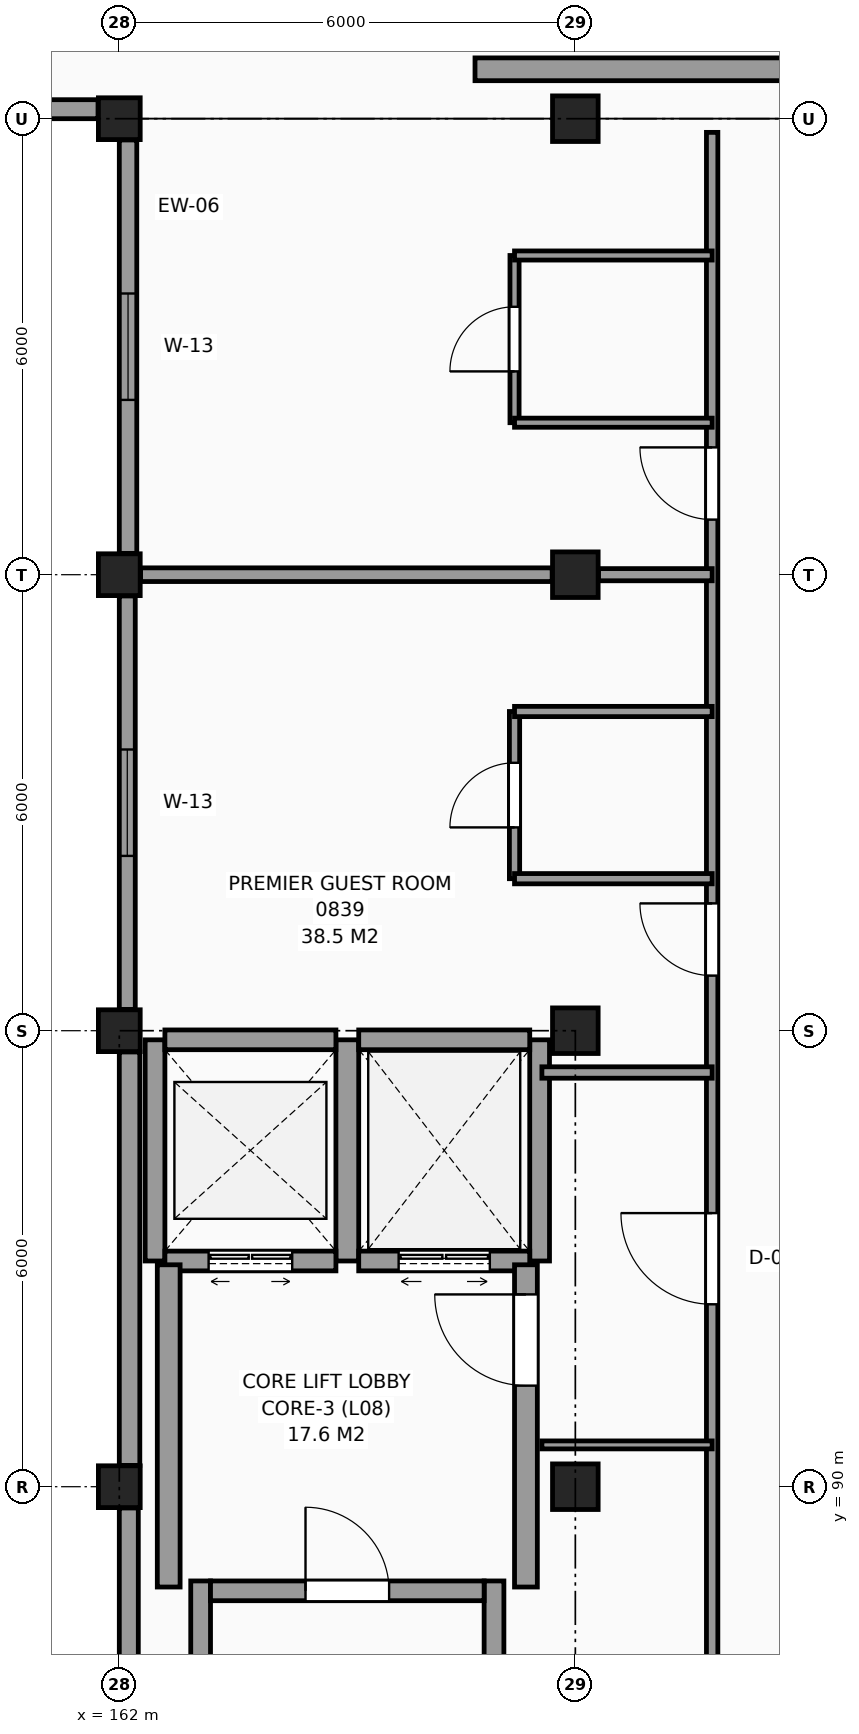
"""IFC4 building model, lengths in metres.
Left out: names, types, materials, properties, quantities, classifications, styles, units other than length and angle.
Written with IfcOpenShell. Run it as: python <this file> out.ifc"""

import sys

from ifc_helpers import new_model, si_unit, direction, frame, frame_2d, origin, origin_2d, place, context, subcontext, project, spatial, rectangle, extrude, element, fill, save


model = new_model("IFC4")
c1 = context("Model", 3, precision=1e-05, world=origin(), true_north=direction((0.0, 1.0)))
c2 = subcontext(c1, "Body", "Model", "MODEL_VIEW")
j1 = project(units=[si_unit("LENGTHUNIT", "METRE"), si_unit("PLANEANGLEUNIT", "RADIAN")], contexts=[c1])
p1 = place(None, origin())
s1 = spatial("IfcSite", under=j1, at=p1, CompositionType="ELEMENT")
p2 = place(p1, origin())
s2 = spatial("IfcBuilding", under=s1, at=p2, CompositionType="ELEMENT")
p3 = place(p2, frame((0.0, 0.0, 34.8)))
s3 = spatial("IfcBuildingStorey", under=s2, at=p3, CompositionType="ELEMENT", Elevation=34.8)
for number, where, z_axis, x_axis in (
    (1, (162.0, 90.0, 0.0), (0.0, 0.0, 1.0), (1.0, 0.0, 0.0)),
    (2, (162.0, 96.0, 0.0), (0.0, 0.0, 1.0), (1.0, 0.0, 0.0)),
    (3, (162.0, 102.0, 0.0), (0.0, 0.0, 1.0), (1.0, 0.0, 0.0)),
    (4, (162.0, 108.0, 0.0), (0.0, 0.0, 1.0), (1.0, 0.0, 0.0)),
):
    element("IfcColumn", number, at=place(p3, frame(where, z_axis=z_axis, x_axis=x_axis)), inside=s3, PredefinedType="COLUMN", context=c2, shape_type="SweptSolid", body=[
        extrude(rectangle(XDim=0.55, YDim=0.55, at=origin_2d()), origin(), (0.0, 0.0, 1.0), 3.3),
    ])
for number, where, z_axis, x_axis in (
    (5, (168.0, 90.0, 0.0), (0.0, 0.0, 1.0), (1.0, 0.0, 0.0)),
    (6, (168.0, 96.0, 0.0), (0.0, 0.0, 1.0), (1.0, 0.0, 0.0)),
    (7, (168.0, 102.0, 0.0), (0.0, 0.0, 1.0), (1.0, 0.0, 0.0)),
    (8, (168.0, 108.0, 0.0), (0.0, 0.0, 1.0), (1.0, 0.0, 0.0)),
):
    element("IfcColumn", number, at=place(p3, frame(where, z_axis=z_axis, x_axis=x_axis)), inside=s3, PredefinedType="COLUMN", context=c2, shape_type="SweptSolid", body=[
        extrude(rectangle(XDim=0.6, YDim=0.6, at=origin_2d()), origin(), (0.0, 0.0, 1.0), 3.3),
    ])
p4 = place(p3, frame((156.305, 108.125, 0.0), z_axis=(0.0, 0.0, 1.0), x_axis=(1.0, 0.0, 0.0)))
e9 = element("IfcWall", 9, at=p4, inside=s3, PredefinedType="SOLIDWALL", context=c2, shape_type="SweptSolid", body=[
    extrude(rectangle(XDim=5.415, YDim=0.25, at=frame_2d((2.708, 0.0))), origin(), (0.0, 0.0, 1.0), 3.07),
])
p5 = place(p3, frame((162.115, 107.72, 0.0), z_axis=(0.0, 0.0, 1.0), x_axis=(0.0, -1.0, 0.0)))
e10 = element("IfcWall", 10, at=p5, inside=s3, PredefinedType="SOLIDWALL", context=c2, shape_type="SweptSolid", body=[
    extrude(rectangle(XDim=5.44, YDim=0.23, at=frame_2d((2.72, 0.0))), origin(), (0.0, 0.0, 1.0), 2.42),
])
p6 = place(p5, frame((2.02, 0.0, 0.8)))
e11 = element("IfcOpeningElement", 11, at=p6, cuts=e10, PredefinedType="OPENING", context=c2, shape_type="SweptSolid", body=[
    extrude(rectangle(XDim=1.4, YDim=1.4, at=frame_2d((0.7, 0.7))), frame((0.0, 0.125, 0.0), z_axis=(0.0, -1.0, 0.0), x_axis=(1.0, 0.0, 0.0)), (0.0, 0.0, 1.0), 0.25),
])
p7 = place(p3, frame((162.105, 101.72, 0.0), z_axis=(0.0, 0.0, 1.0), x_axis=(0.0, -1.0, 0.0)))
e12 = element("IfcWall", 12, at=p7, inside=s3, PredefinedType="SOLIDWALL", context=c2, shape_type="SweptSolid", body=[
    extrude(rectangle(XDim=5.44, YDim=0.21, at=frame_2d((2.72, 0.0))), origin(), (0.0, 0.0, 1.0), 2.42),
])
p8 = place(p7, frame((2.02, 0.0, 0.8)))
e13 = element("IfcOpeningElement", 13, at=p8, cuts=e12, PredefinedType="OPENING", context=c2, shape_type="SweptSolid", body=[
    extrude(rectangle(XDim=1.4, YDim=1.4, at=frame_2d((0.7, 0.7))), frame((0.0, 0.115, 0.0), z_axis=(0.0, -1.0, 0.0), x_axis=(1.0, 0.0, 0.0)), (0.0, 0.0, 1.0), 0.23),
])
p9 = place(p3, frame((162.135, 95.72, 0.0), z_axis=(0.0, 0.0, 1.0), x_axis=(0.0, -1.0, 0.0)))
e14 = element("IfcWall", 14, at=p9, inside=s3, PredefinedType="SOLIDWALL", context=c2, shape_type="SweptSolid", body=[
    extrude(rectangle(XDim=5.44, YDim=0.27, at=frame_2d((2.72, 0.0))), origin(), (0.0, 0.0, 1.0), 2.42),
])
p10 = place(p3, frame((162.125, 89.72, 0.0), z_axis=(0.0, 0.0, 1.0), x_axis=(0.0, -1.0, 0.0)))
e15 = element("IfcWall", 15, at=p10, inside=s3, PredefinedType="SOLIDWALL", context=c2, shape_type="SweptSolid", body=[
    extrude(rectangle(XDim=5.44, YDim=0.25, at=frame_2d((2.72, 0.0))), origin(), (0.0, 0.0, 1.0), 2.42),
])
p11 = place(p3, frame((166.68, 108.65, 0.0), z_axis=(0.0, 0.0, 1.0), x_axis=(1.0, 0.0, 0.0)))
e16 = element("IfcWall", 16, at=p11, inside=s3, PredefinedType="SHEAR", context=c2, shape_type="SweptSolid", body=[
    extrude(rectangle(XDim=4.24, YDim=0.3, at=frame_2d((2.12, 0.0))), origin(), (0.0, 0.0, 1.0), 3.3),
])
for number, where, z_axis, x_axis in (
    (17, (163.07, 78.04, 0.0), (0.0, 0.0, 1.0), (0.0, 1.0, 0.0)),
    (18, (166.93, 78.04, 0.0), (0.0, 0.0, 1.0), (0.0, 1.0, 0.0)),
):
    element("IfcWall", number, at=place(p3, frame(where, z_axis=z_axis, x_axis=x_axis)), inside=s3, PredefinedType="SHEAR", context=c2, shape_type="SweptSolid", body=[
        extrude(rectangle(XDim=10.72, YDim=0.26, at=frame_2d((5.36, 0.0))), origin(), (0.0, 0.0, 1.0), 3.3),
    ])
p12 = place(p3, frame((163.2, 88.63, 0.0), z_axis=(0.0, 0.0, 1.0), x_axis=(1.0, 0.0, 0.0)))
e19 = element("IfcWall", 19, at=p12, inside=s3, PredefinedType="SHEAR", context=c2, shape_type="SweptSolid", body=[
    extrude(rectangle(XDim=3.6, YDim=0.26, at=frame_2d((1.8, 0.0))), origin(), (0.0, 0.0, 1.0), 3.3),
])
p13 = place(p12, frame((1.25, 0.0, 0.0)))
e20 = element("IfcOpeningElement", 20, at=p13, cuts=e19, PredefinedType="OPENING", context=c2, shape_type="SweptSolid", body=[
    extrude(rectangle(XDim=1.1, YDim=2.15, at=frame_2d((0.55, 1.075))), frame((0.0, 0.14, 0.0), z_axis=(0.0, -1.0, 0.0), x_axis=(1.0, 0.0, 0.0)), (0.0, 0.0, 1.0), 0.28),
])
p14 = place(p3, frame((162.47, 92.97, 0.0), z_axis=(0.0, 0.0, 1.0), x_axis=(0.0, 1.0, 0.0)))
e21 = element("IfcWall", 21, at=p14, inside=s3, PredefinedType="SHEAR", context=c2, shape_type="SweptSolid", body=[
    extrude(rectangle(XDim=2.91, YDim=0.26, at=frame_2d((1.455, 0.0))), origin(), (0.0, 0.0, 1.0), 3.3),
])
p15 = place(p3, frame((165.0, 92.97, 0.0), z_axis=(0.0, 0.0, 1.0), x_axis=(0.0, 1.0, 0.0)))
e22 = element("IfcWall", 22, at=p15, inside=s3, PredefinedType="SHEAR", context=c2, shape_type="SweptSolid", body=[
    extrude(rectangle(XDim=2.91, YDim=0.3, at=frame_2d((1.455, 0.0))), origin(), (0.0, 0.0, 1.0), 3.3),
])
p16 = place(p3, frame((162.6, 95.88, 0.0), z_axis=(0.0, 0.0, 1.0), x_axis=(1.0, 0.0, 0.0)))
e23 = element("IfcWall", 23, at=p16, inside=s3, PredefinedType="SHEAR", context=c2, shape_type="SweptSolid", body=[
    extrude(rectangle(XDim=2.25, YDim=0.26, at=frame_2d((1.125, 0.0))), origin(), (0.0, 0.0, 1.0), 3.3),
])
p17 = place(p3, frame((162.6, 92.97, 0.0), z_axis=(0.0, 0.0, 1.0), x_axis=(1.0, 0.0, 0.0)))
e24 = element("IfcWall", 24, at=p17, inside=s3, PredefinedType="SHEAR", context=c2, shape_type="SweptSolid", body=[
    extrude(rectangle(XDim=2.25, YDim=0.26, at=frame_2d((1.125, 0.0))), origin(), (0.0, 0.0, 1.0), 3.3),
])
p18 = place(p17, frame((0.575, 0.0, 0.0)))
e25 = element("IfcOpeningElement", 25, at=p18, cuts=e24, PredefinedType="OPENING", context=c2, shape_type="SweptSolid", body=[
    extrude(rectangle(XDim=1.1, YDim=2.2, at=frame_2d((0.55, 1.1))), frame((0.0, 0.14, 0.0), z_axis=(0.0, -1.0, 0.0), x_axis=(1.0, 0.0, 0.0)), (0.0, 0.0, 1.0), 0.28),
])
p19 = place(p3, frame((167.53, 92.97, 0.0), z_axis=(0.0, 0.0, 1.0), x_axis=(0.0, 1.0, 0.0)))
e26 = element("IfcWall", 26, at=p19, inside=s3, PredefinedType="SHEAR", context=c2, shape_type="SweptSolid", body=[
    extrude(rectangle(XDim=2.91, YDim=0.26, at=frame_2d((1.455, 0.0))), origin(), (0.0, 0.0, 1.0), 3.3),
])
p20 = place(p3, frame((165.15, 95.88, 0.0), z_axis=(0.0, 0.0, 1.0), x_axis=(1.0, 0.0, 0.0)))
e27 = element("IfcWall", 27, at=p20, inside=s3, PredefinedType="SHEAR", context=c2, shape_type="SweptSolid", body=[
    extrude(rectangle(XDim=2.25, YDim=0.26, at=frame_2d((1.125, 0.0))), origin(), (0.0, 0.0, 1.0), 3.3),
])
p21 = place(p3, frame((165.15, 92.97, 0.0), z_axis=(0.0, 0.0, 1.0), x_axis=(1.0, 0.0, 0.0)))
e28 = element("IfcWall", 28, at=p21, inside=s3, PredefinedType="SHEAR", context=c2, shape_type="SweptSolid", body=[
    extrude(rectangle(XDim=2.25, YDim=0.26, at=frame_2d((1.125, 0.0))), origin(), (0.0, 0.0, 1.0), 3.3),
])
p22 = place(p21, frame((0.525, 0.0, 0.0)))
e29 = element("IfcOpeningElement", 29, at=p22, cuts=e28, PredefinedType="OPENING", context=c2, shape_type="SweptSolid", body=[
    extrude(rectangle(XDim=1.2, YDim=2.25, at=frame_2d((0.6, 1.125))), frame((0.0, 0.14, 0.0), z_axis=(0.0, -1.0, 0.0), x_axis=(1.0, 0.0, 0.0)), (0.0, 0.0, 1.0), 0.28),
])
p23 = place(p3, frame((167.35, 88.68, 0.0), z_axis=(0.0, 0.0, 1.0), x_axis=(0.0, 1.0, 0.0)))
e30 = element("IfcWall", 30, at=p23, inside=s3, PredefinedType="SHEAR", context=c2, shape_type="SweptSolid", body=[
    extrude(rectangle(XDim=4.24, YDim=0.3, at=frame_2d((2.12, 0.0))), origin(), (0.0, 0.0, 1.0), 3.3),
])
p24 = place(p23, frame((2.65, 0.0, 0.0)))
e31 = element("IfcOpeningElement", 31, at=p24, cuts=e30, PredefinedType="OPENING", context=c2, shape_type="SweptSolid", body=[
    extrude(rectangle(XDim=1.2, YDim=2.2, at=frame_2d((0.6, 1.1))), frame((0.0, 0.16, 0.0), z_axis=(0.0, -1.0, 0.0), x_axis=(1.0, 0.0, 0.0)), (0.0, 0.0, 1.0), 0.32),
])
p25 = place(p3, frame((162.65, 88.68, 0.0), z_axis=(0.0, 0.0, 1.0), x_axis=(0.0, 1.0, 0.0)))
e32 = element("IfcWall", 32, at=p25, inside=s3, PredefinedType="SHEAR", context=c2, shape_type="SweptSolid", body=[
    extrude(rectangle(XDim=4.24, YDim=0.3, at=frame_2d((2.12, 0.0))), origin(), (0.0, 0.0, 1.0), 3.3),
])
p26 = place(p3, frame((167.2, 98.0, 0.0), z_axis=(0.0, 0.0, 1.0), x_axis=(0.0, 1.0, 0.0)))
e33 = element("IfcWall", 33, at=p26, inside=s3, PredefinedType="PARTITIONING", context=c2, shape_type="SweptSolid", body=[
    extrude(rectangle(XDim=2.2, YDim=0.135, at=frame_2d((1.1, 0.0))), origin(), (0.0, 0.0, 1.0), 3.07),
])
p27 = place(p26, frame((0.675, 0.0, 0.0)))
e34 = element("IfcOpeningElement", 34, at=p27, cuts=e33, PredefinedType="OPENING", context=c2, shape_type="SweptSolid", body=[
    extrude(rectangle(XDim=0.85, YDim=2.1, at=frame_2d((0.425, 1.05))), frame((0.0, 0.078, 0.0), z_axis=(0.0, -1.0, 0.0), x_axis=(1.0, 0.0, 0.0)), (0.0, 0.0, 1.0), 0.155),
])
p28 = place(p3, frame((167.2, 104.0, 0.0), z_axis=(0.0, 0.0, 1.0), x_axis=(0.0, 1.0, 0.0)))
e35 = element("IfcWall", 35, at=p28, inside=s3, PredefinedType="PARTITIONING", context=c2, shape_type="SweptSolid", body=[
    extrude(rectangle(XDim=2.2, YDim=0.12, at=frame_2d((1.1, 0.0))), origin(), (0.0, 0.0, 1.0), 3.07),
])
p29 = place(p28, frame((0.675, 0.0, 0.0)))
e36 = element("IfcOpeningElement", 36, at=p29, cuts=e35, PredefinedType="OPENING", context=c2, shape_type="SweptSolid", body=[
    extrude(rectangle(XDim=0.85, YDim=2.1, at=frame_2d((0.425, 1.05))), frame((0.0, 0.07, 0.0), z_axis=(0.0, -1.0, 0.0), x_axis=(1.0, 0.0, 0.0)), (0.0, 0.0, 1.0), 0.14),
])
p30 = place(p3, frame((169.8, 42.235, 0.0), z_axis=(0.0, 0.0, 1.0), x_axis=(0.0, 1.0, 0.0)))
e37 = element("IfcWall", 37, at=p30, inside=s3, PredefinedType="PARTITIONING", context=c2, shape_type="SweptSolid", body=[
    extrude(rectangle(XDim=65.585, YDim=0.15, at=frame_2d((32.792, 0.0))), origin(), (0.0, 0.0, 1.0), 3.07),
])
p31 = place(p30, frame((50.165, 0.0, 0.0)))
e38 = element("IfcOpeningElement", 38, at=p31, cuts=e37, PredefinedType="OPENING", context=c2, shape_type="SweptSolid", body=[
    extrude(rectangle(XDim=1.2, YDim=2.2, at=frame_2d((0.6, 1.1))), frame((0.0, 0.085, 0.0), z_axis=(0.0, -1.0, 0.0), x_axis=(1.0, 0.0, 0.0)), (0.0, 0.0, 1.0), 0.17),
])
p32 = place(p30, frame((0.44, 0.0, 0.0)))
e39 = element("IfcOpeningElement", 39, at=p32, cuts=e37, PredefinedType="OPENING", context=c2, shape_type="SweptSolid", body=[
    extrude(rectangle(XDim=0.95, YDim=2.1, at=frame_2d((0.475, 1.05))), frame((0.0, 0.085, 0.0), z_axis=(0.0, -1.0, 0.0), x_axis=(1.0, 0.0, 0.0)), (0.0, 0.0, 1.0), 0.17),
])
p33 = place(p30, frame((6.49, 0.0, 0.0)))
e40 = element("IfcOpeningElement", 40, at=p33, cuts=e37, PredefinedType="OPENING", context=c2, shape_type="SweptSolid", body=[
    extrude(rectangle(XDim=0.95, YDim=2.1, at=frame_2d((0.475, 1.05))), frame((0.0, 0.085, 0.0), z_axis=(0.0, -1.0, 0.0), x_axis=(1.0, 0.0, 0.0)), (0.0, 0.0, 1.0), 0.17),
])
p34 = place(p30, frame((12.49, 0.0, 0.0)))
e41 = element("IfcOpeningElement", 41, at=p34, cuts=e37, PredefinedType="OPENING", context=c2, shape_type="SweptSolid", body=[
    extrude(rectangle(XDim=0.95, YDim=2.1, at=frame_2d((0.475, 1.05))), frame((0.0, 0.085, 0.0), z_axis=(0.0, -1.0, 0.0), x_axis=(1.0, 0.0, 0.0)), (0.0, 0.0, 1.0), 0.17),
])
p35 = place(p30, frame((18.49, 0.0, 0.0)))
e42 = element("IfcOpeningElement", 42, at=p35, cuts=e37, PredefinedType="OPENING", context=c2, shape_type="SweptSolid", body=[
    extrude(rectangle(XDim=0.95, YDim=2.1, at=frame_2d((0.475, 1.05))), frame((0.0, 0.085, 0.0), z_axis=(0.0, -1.0, 0.0), x_axis=(1.0, 0.0, 0.0)), (0.0, 0.0, 1.0), 0.17),
])
p36 = place(p30, frame((24.49, 0.0, 0.0)))
e43 = element("IfcOpeningElement", 43, at=p36, cuts=e37, PredefinedType="OPENING", context=c2, shape_type="SweptSolid", body=[
    extrude(rectangle(XDim=0.95, YDim=2.1, at=frame_2d((0.475, 1.05))), frame((0.0, 0.085, 0.0), z_axis=(0.0, -1.0, 0.0), x_axis=(1.0, 0.0, 0.0)), (0.0, 0.0, 1.0), 0.17),
])
p37 = place(p30, frame((30.49, 0.0, 0.0)))
e44 = element("IfcOpeningElement", 44, at=p37, cuts=e37, PredefinedType="OPENING", context=c2, shape_type="SweptSolid", body=[
    extrude(rectangle(XDim=0.95, YDim=2.1, at=frame_2d((0.475, 1.05))), frame((0.0, 0.085, 0.0), z_axis=(0.0, -1.0, 0.0), x_axis=(1.0, 0.0, 0.0)), (0.0, 0.0, 1.0), 0.17),
])
p38 = place(p30, frame((54.49, 0.0, 0.0)))
e45 = element("IfcOpeningElement", 45, at=p38, cuts=e37, PredefinedType="OPENING", context=c2, shape_type="SweptSolid", body=[
    extrude(rectangle(XDim=0.95, YDim=2.1, at=frame_2d((0.475, 1.05))), frame((0.0, 0.085, 0.0), z_axis=(0.0, -1.0, 0.0), x_axis=(1.0, 0.0, 0.0)), (0.0, 0.0, 1.0), 0.17),
])
p39 = place(p30, frame((60.49, 0.0, 0.0)))
e46 = element("IfcOpeningElement", 46, at=p39, cuts=e37, PredefinedType="OPENING", context=c2, shape_type="SweptSolid", body=[
    extrude(rectangle(XDim=0.95, YDim=2.1, at=frame_2d((0.475, 1.05))), frame((0.0, 0.085, 0.0), z_axis=(0.0, -1.0, 0.0), x_axis=(1.0, 0.0, 0.0)), (0.0, 0.0, 1.0), 0.17),
])
p40 = place(p3, frame((167.56, 90.55, 0.0), z_axis=(0.0, 0.0, 1.0), x_axis=(1.0, 0.0, 0.0)))
e47 = element("IfcWall", 47, at=p40, inside=s3, PredefinedType="PARTITIONING", context=c2, shape_type="SweptSolid", body=[
    extrude(rectangle(XDim=2.24, YDim=0.105, at=frame_2d((1.12, 0.0))), origin(), (0.0, 0.0, 1.0), 3.07),
])
p41 = place(p3, frame((167.56, 95.45, 0.0), z_axis=(0.0, 0.0, 1.0), x_axis=(1.0, 0.0, 0.0)))
e48 = element("IfcWall", 48, at=p41, inside=s3, PredefinedType="PARTITIONING", context=c2, shape_type="SweptSolid", body=[
    extrude(rectangle(XDim=2.24, YDim=0.15, at=frame_2d((1.12, 0.0))), origin(), (0.0, 0.0, 1.0), 3.07),
])
for number, where, z_axis, x_axis in (
    (49, (167.2, 98.0, 0.0), (0.0, 0.0, 1.0), (1.0, 0.0, 0.0)),
    (50, (167.2, 100.2, 0.0), (0.0, 0.0, 1.0), (1.0, 0.0, 0.0)),
):
    element("IfcWall", number, at=place(p3, frame(where, z_axis=z_axis, x_axis=x_axis)), inside=s3, PredefinedType="PARTITIONING", context=c2, shape_type="SweptSolid", body=[
        extrude(rectangle(XDim=2.6, YDim=0.135, at=frame_2d((1.3, 0.0))), origin(), (0.0, 0.0, 1.0), 3.07),
    ])
p42 = place(p3, frame((162.28, 102.0, 0.0), z_axis=(0.0, 0.0, 1.0), x_axis=(1.0, 0.0, 0.0)))
e51 = element("IfcWall", 51, at=p42, inside=s3, PredefinedType="PARTITIONING", context=c2, shape_type="SweptSolid", body=[
    extrude(rectangle(XDim=5.415, YDim=0.18, at=frame_2d((2.708, 0.0))), origin(), (0.0, 0.0, 1.0), 2.37),
])
p43 = place(p3, frame((168.305, 102.0, 0.0), z_axis=(0.0, 0.0, 1.0), x_axis=(1.0, 0.0, 0.0)))
e52 = element("IfcWall", 52, at=p43, inside=s3, PredefinedType="PARTITIONING", context=c2, shape_type="SweptSolid", body=[
    extrude(rectangle(XDim=1.495, YDim=0.16, at=frame_2d((0.748, 0.0))), origin(), (0.0, 0.0, 1.0), 2.47),
])
for number, where, z_axis, x_axis in (
    (53, (167.2, 104.0, 0.0), (0.0, 0.0, 1.0), (1.0, 0.0, 0.0)),
    (54, (167.2, 106.2, 0.0), (0.0, 0.0, 1.0), (1.0, 0.0, 0.0)),
):
    element("IfcWall", number, at=place(p3, frame(where, z_axis=z_axis, x_axis=x_axis)), inside=s3, PredefinedType="PARTITIONING", context=c2, shape_type="SweptSolid", body=[
        extrude(rectangle(XDim=2.6, YDim=0.12, at=frame_2d((1.3, 0.0))), origin(), (0.0, 0.0, 1.0), 3.07),
    ])
p44 = place(p8, origin())
e55 = element("IfcWindow", 55, at=p44, inside=s3, PartitioningType="SINGLE_PANEL", PredefinedType="WINDOW", context=c2, shape_type="SweptSolid", body=[
    extrude(rectangle(XDim=1.4, YDim=1.4, at=frame_2d((0.7, 0.7))), frame((0.0, 0.03, 0.0), z_axis=(0.0, -1.0, 0.0), x_axis=(1.0, 0.0, 0.0)), (0.0, 0.0, 1.0), 0.06),
])
fill(e13, e55)
p45 = place(p6, origin())
e56 = element("IfcWindow", 56, at=p45, inside=s3, PartitioningType="SINGLE_PANEL", PredefinedType="WINDOW", context=c2, shape_type="SweptSolid", body=[
    extrude(rectangle(XDim=1.4, YDim=1.4, at=frame_2d((0.7, 0.7))), frame((0.0, 0.03, 0.0), z_axis=(0.0, -1.0, 0.0), x_axis=(1.0, 0.0, 0.0)), (0.0, 0.0, 1.0), 0.06),
])
fill(e11, e56)
p46 = place(p13, origin())
e57 = element("IfcDoor", 57, at=p46, inside=s3, OperationType="SINGLE_SWING_LEFT", PredefinedType="DOOR", context=c2, shape_type="SweptSolid", body=[
    extrude(rectangle(XDim=1.1, YDim=2.15, at=frame_2d((0.55, 1.075))), frame((0.0, 0.025, 0.0), z_axis=(0.0, -1.0, 0.0), x_axis=(1.0, 0.0, 0.0)), (0.0, 0.0, 1.0), 0.05),
])
fill(e20, e57)
p47 = place(p18, origin())
e58 = element("IfcDoor", 58, at=p47, inside=s3, OperationType="DOUBLE_DOOR_SLIDING", PredefinedType="DOOR", context=c2, shape_type="SweptSolid", body=[
    extrude(rectangle(XDim=1.1, YDim=2.2, at=frame_2d((0.55, 1.1))), frame((0.0, 0.025, 0.0), z_axis=(0.0, -1.0, 0.0), x_axis=(1.0, 0.0, 0.0)), (0.0, 0.0, 1.0), 0.05),
])
fill(e25, e58)
p48 = place(p22, origin())
e59 = element("IfcDoor", 59, at=p48, inside=s3, OperationType="DOUBLE_DOOR_SLIDING", PredefinedType="DOOR", context=c2, shape_type="SweptSolid", body=[
    extrude(rectangle(XDim=1.2, YDim=2.25, at=frame_2d((0.6, 1.125))), frame((0.0, 0.025, 0.0), z_axis=(0.0, -1.0, 0.0), x_axis=(1.0, 0.0, 0.0)), (0.0, 0.0, 1.0), 0.05),
])
fill(e29, e59)
p49 = place(p24, origin())
e60 = element("IfcDoor", 60, at=p49, inside=s3, OperationType="SINGLE_SWING_RIGHT", PredefinedType="DOOR", context=c2, shape_type="SweptSolid", body=[
    extrude(rectangle(XDim=1.2, YDim=2.2, at=frame_2d((0.6, 1.1))), frame((0.0, 0.025, 0.0), z_axis=(0.0, -1.0, 0.0), x_axis=(1.0, 0.0, 0.0)), (0.0, 0.0, 1.0), 0.05),
])
fill(e31, e60)
p50 = place(p31, origin())
e61 = element("IfcDoor", 61, at=p50, inside=s3, OperationType="SINGLE_SWING_RIGHT", PredefinedType="DOOR", context=c2, shape_type="SweptSolid", body=[
    extrude(rectangle(XDim=1.2, YDim=2.2, at=frame_2d((0.6, 1.1))), frame((0.0, 0.025, 0.0), z_axis=(0.0, -1.0, 0.0), x_axis=(1.0, 0.0, 0.0)), (0.0, 0.0, 1.0), 0.05),
])
fill(e38, e61)
p51 = place(p27, origin())
e62 = element("IfcDoor", 62, at=p51, inside=s3, OperationType="SINGLE_SWING_LEFT", PredefinedType="DOOR", context=c2, shape_type="SweptSolid", body=[
    extrude(rectangle(XDim=0.85, YDim=2.1, at=frame_2d((0.425, 1.05))), frame((0.0, 0.025, 0.0), z_axis=(0.0, -1.0, 0.0), x_axis=(1.0, 0.0, 0.0)), (0.0, 0.0, 1.0), 0.05),
])
fill(e34, e62)
p52 = place(p38, origin())
e63 = element("IfcDoor", 63, at=p52, inside=s3, OperationType="SINGLE_SWING_RIGHT", PredefinedType="DOOR", context=c2, shape_type="SweptSolid", body=[
    extrude(rectangle(XDim=0.95, YDim=2.1, at=frame_2d((0.475, 1.05))), frame((0.0, 0.025, 0.0), z_axis=(0.0, -1.0, 0.0), x_axis=(1.0, 0.0, 0.0)), (0.0, 0.0, 1.0), 0.05),
])
fill(e45, e63)
p53 = place(p29, origin())
e64 = element("IfcDoor", 64, at=p53, inside=s3, OperationType="SINGLE_SWING_LEFT", PredefinedType="DOOR", context=c2, shape_type="SweptSolid", body=[
    extrude(rectangle(XDim=0.85, YDim=2.1, at=frame_2d((0.425, 1.05))), frame((0.0, 0.025, 0.0), z_axis=(0.0, -1.0, 0.0), x_axis=(1.0, 0.0, 0.0)), (0.0, 0.0, 1.0), 0.05),
])
fill(e36, e64)
p54 = place(p39, origin())
e65 = element("IfcDoor", 65, at=p54, inside=s3, OperationType="SINGLE_SWING_RIGHT", PredefinedType="DOOR", context=c2, shape_type="SweptSolid", body=[
    extrude(rectangle(XDim=0.95, YDim=2.1, at=frame_2d((0.475, 1.05))), frame((0.0, 0.025, 0.0), z_axis=(0.0, -1.0, 0.0), x_axis=(1.0, 0.0, 0.0)), (0.0, 0.0, 1.0), 0.05),
])
fill(e46, e65)
save(model, sys.argv[1])
